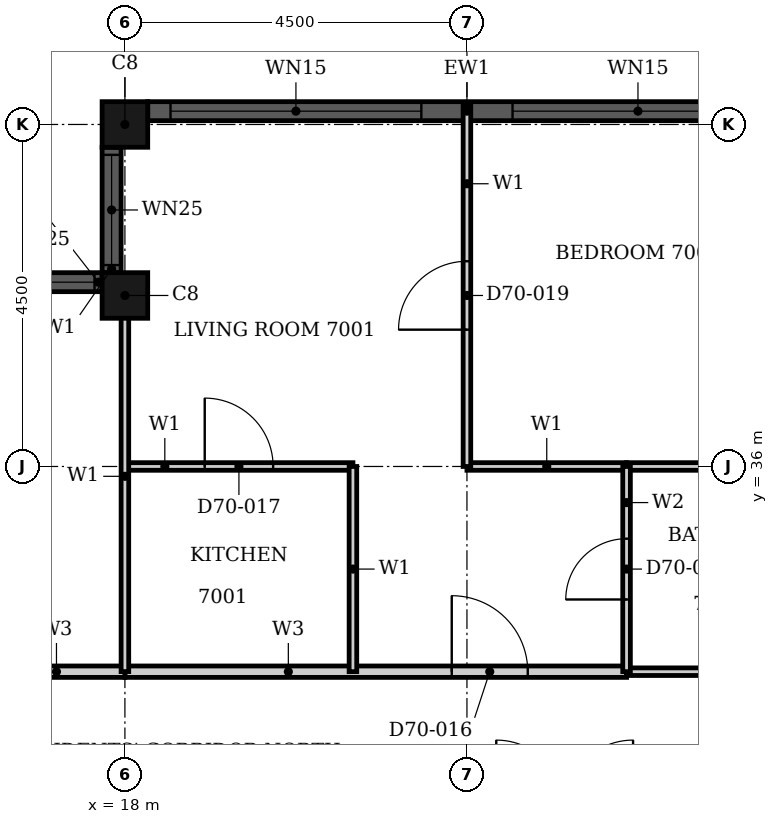
"""IFC4 building model, lengths in metres.
Left out: names, types, materials, properties, quantities, classifications, styles, units other than length and angle.
Written with IfcOpenShell. Run it as: python <this file> out.ifc"""

import sys

from ifc_helpers import new_model, si_unit, direction, frame, frame_2d, origin, origin_2d, place, context, subcontext, project, spatial, rectangle, hollow_rectangle, extrude, element, fill, save


model = new_model("IFC4")
c1 = context("Model", 3, precision=1e-05, world=origin(), true_north=direction((0.0, 1.0)))
c2 = subcontext(c1, "Body", "Model", "MODEL_VIEW")
j1 = project(units=[si_unit("LENGTHUNIT", "METRE"), si_unit("PLANEANGLEUNIT", "RADIAN")], contexts=[c1])
p1 = place(None, origin())
s1 = spatial("IfcSite", under=j1, at=p1, CompositionType="ELEMENT")
p2 = place(p1, origin())
s2 = spatial("IfcBuilding", under=s1, at=p2, CompositionType="ELEMENT")
p3 = place(p2, frame((0.0, 0.0, 274.9)))
s3 = spatial("IfcBuildingStorey", under=s2, at=p3, CompositionType="ELEMENT", Elevation=274.9)
for number, where, z_axis, x_axis in (
    (1, (18.0, 40.5, 0.0), (0.0, 0.0, 1.0), (1.0, 0.0, 0.0)),
    (2, (18.0, 38.25, 0.0), (0.0, 0.0, 1.0), (1.0, 0.0, 0.0)),
):
    element("IfcColumn", number, at=place(p3, frame(where, z_axis=z_axis, x_axis=x_axis)), inside=s3, PredefinedType="COLUMN", context=c2, shape_type="SweptSolid", body=[
        extrude(hollow_rectangle(XDim=0.6, YDim=0.6, WallThickness=0.02, at=origin_2d()), origin(), (0.0, 0.0, 1.0), 3.7),
    ])
p4 = place(p3, frame((26.7, 40.675, 0.0), z_axis=(0.0, 0.0, 1.0), x_axis=(-1.0, 0.0, 0.0)))
e3 = element("IfcWall", 3, at=p4, inside=s3, PredefinedType="SOLIDWALL", context=c2, shape_type="SweptSolid", body=[
    extrude(rectangle(XDim=8.4, YDim=0.25, at=frame_2d((4.2, 0.0))), origin(), (0.0, 0.0, 1.0), 3.7),
])
p5 = place(p4, frame((0.3, 0.0, 0.45)))
e4 = element("IfcOpeningElement", 4, at=p5, cuts=e3, PredefinedType="OPENING", context=c2, shape_type="SweptSolid", body=[
    extrude(rectangle(XDim=3.3, YDim=2.3, at=frame_2d((1.65, 1.15))), frame((0.0, 0.135, 0.0), z_axis=(0.0, -1.0, 0.0), x_axis=(1.0, 0.0, 0.0)), (0.0, 0.0, 1.0), 0.27),
])
p6 = place(p4, frame((4.8, 0.0, 0.45)))
e5 = element("IfcOpeningElement", 5, at=p6, cuts=e3, PredefinedType="OPENING", context=c2, shape_type="SweptSolid", body=[
    extrude(rectangle(XDim=3.3, YDim=2.3, at=frame_2d((1.65, 1.15))), frame((0.0, 0.135, 0.0), z_axis=(0.0, -1.0, 0.0), x_axis=(1.0, 0.0, 0.0)), (0.0, 0.0, 1.0), 0.27),
])
p7 = place(p3, frame((17.825, 40.2, 0.0), z_axis=(0.0, 0.0, 1.0), x_axis=(0.0, -1.0, 0.0)))
e6 = element("IfcWall", 6, at=p7, inside=s3, PredefinedType="SOLIDWALL", context=c2, shape_type="SweptSolid", body=[
    extrude(rectangle(XDim=1.65, YDim=0.25, at=frame_2d((0.825, 0.0))), origin(), (0.0, 0.0, 1.0), 3.7),
])
p8 = place(p7, frame((0.1, 0.0, 0.9)))
e7 = element("IfcOpeningElement", 7, at=p8, cuts=e6, PredefinedType="OPENING", context=c2, shape_type="SweptSolid", body=[
    extrude(rectangle(XDim=1.45, YDim=1.85, at=frame_2d((0.725, 0.925))), frame((0.0, 0.135, 0.0), z_axis=(0.0, -1.0, 0.0), x_axis=(1.0, 0.0, 0.0)), (0.0, 0.0, 1.0), 0.27),
])
p9 = place(p3, frame((17.7, 38.425, 0.0), z_axis=(0.0, 0.0, 1.0), x_axis=(-1.0, 0.0, 0.0)))
e8 = element("IfcWall", 8, at=p9, inside=s3, PredefinedType="SOLIDWALL", context=c2, shape_type="SweptSolid", body=[
    extrude(rectangle(XDim=1.65, YDim=0.25, at=frame_2d((0.825, 0.0))), origin(), (0.0, 0.0, 1.0), 3.7),
])
p10 = place(p9, frame((0.1, 0.0, 0.9)))
e9 = element("IfcOpeningElement", 9, at=p10, cuts=e8, PredefinedType="OPENING", context=c2, shape_type="SweptSolid", body=[
    extrude(rectangle(XDim=1.45, YDim=1.85, at=frame_2d((0.725, 0.925))), frame((0.0, 0.135, 0.0), z_axis=(0.0, -1.0, 0.0), x_axis=(1.0, 0.0, 0.0)), (0.0, 0.0, 1.0), 0.27),
])
p11 = place(p3, frame((18.0, 33.3, 0.0), z_axis=(0.0, 0.0, 1.0), x_axis=(1.0, 0.0, 0.0)))
e10 = element("IfcWall", 10, at=p11, inside=s3, PredefinedType="PARTITIONING", context=c2, shape_type="SweptSolid", body=[
    extrude(rectangle(XDim=6.6, YDim=0.15, at=frame_2d((3.3, 0.0))), origin(), (0.0, 0.0, 1.0), 3.3),
])
p12 = place(p11, frame((4.3, 0.0, 0.0)))
e11 = element("IfcOpeningElement", 11, at=p12, cuts=e10, PredefinedType="OPENING", context=c2, shape_type="SweptSolid", body=[
    extrude(rectangle(XDim=1.0, YDim=2.2, at=frame_2d((0.5, 1.1))), frame((0.0, 0.085, 0.0), z_axis=(0.0, -1.0, 0.0), x_axis=(1.0, 0.0, 0.0)), (0.0, 0.0, 1.0), 0.17),
])
p13 = place(p3, frame((16.2, 33.3, 0.0), z_axis=(0.0, 0.0, 1.0), x_axis=(1.0, 0.0, 0.0)))
e12 = element("IfcWall", 12, at=p13, inside=s3, PredefinedType="PARTITIONING", context=c2, shape_type="SweptSolid", body=[
    extrude(rectangle(XDim=1.799, YDim=0.15, at=frame_2d((0.899, 0.0))), origin(), (0.0, 0.0, 1.0), 3.3),
])
p14 = place(p3, frame((22.5, 36.0, 0.0), z_axis=(0.0, 0.0, 1.0), x_axis=(1.0, 0.0, 0.0)))
e13 = element("IfcWall", 13, at=p14, inside=s3, PredefinedType="PARTITIONING", context=c2, shape_type="SweptSolid", body=[
    extrude(rectangle(XDim=2.1, YDim=0.1, at=frame_2d((1.05, 0.0))), origin(), (0.0, 0.0, 1.0), 3.3),
])
p15 = place(p3, frame((18.0, 36.0, 0.0), z_axis=(0.0, 0.0, 1.0), x_axis=(1.0, 0.0, 0.0)))
e14 = element("IfcWall", 14, at=p15, inside=s3, PredefinedType="PARTITIONING", context=c2, shape_type="SweptSolid", body=[
    extrude(rectangle(XDim=3.0, YDim=0.1, at=frame_2d((1.5, 0.0))), origin(), (0.0, 0.0, 1.0), 3.3),
])
p16 = place(p15, frame((1.05, 0.0, 0.0)))
e15 = element("IfcOpeningElement", 15, at=p16, cuts=e14, PredefinedType="OPENING", context=c2, shape_type="SweptSolid", body=[
    extrude(rectangle(XDim=0.9, YDim=2.1, at=frame_2d((0.45, 1.05))), frame((0.0, 0.06, 0.0), z_axis=(0.0, -1.0, 0.0), x_axis=(1.0, 0.0, 0.0)), (0.0, 0.0, 1.0), 0.12),
])
p17 = place(p3, frame((18.0, 33.301, 0.0), z_axis=(0.0, 0.0, 1.0), x_axis=(0.0, 1.0, 0.0)))
e16 = element("IfcWall", 16, at=p17, inside=s3, PredefinedType="PARTITIONING", context=c2, shape_type="SweptSolid", body=[
    extrude(rectangle(XDim=5.139, YDim=0.1, at=frame_2d((2.569, 0.0))), origin(), (0.0, 0.0, 1.0), 3.3),
])
p18 = place(p3, frame((21.0, 33.3, 0.0), z_axis=(0.0, 0.0, 1.0), x_axis=(0.0, 1.0, 0.0)))
e17 = element("IfcWall", 17, at=p18, inside=s3, PredefinedType="PARTITIONING", context=c2, shape_type="SweptSolid", body=[
    extrude(rectangle(XDim=2.7, YDim=0.1, at=frame_2d((1.35, 0.0))), origin(), (0.0, 0.0, 1.0), 3.3),
])
p19 = place(p3, frame((22.5, 36.0, 0.0), z_axis=(0.0, 0.0, 1.0), x_axis=(0.0, 1.0, 0.0)))
e18 = element("IfcWall", 18, at=p19, inside=s3, PredefinedType="PARTITIONING", context=c2, shape_type="SweptSolid", body=[
    extrude(rectangle(XDim=4.74, YDim=0.1, at=frame_2d((2.37, 0.0))), origin(), (0.0, 0.0, 1.0), 3.3),
])
p20 = place(p19, frame((1.8, 0.0, 0.0)))
e19 = element("IfcOpeningElement", 19, at=p20, cuts=e18, PredefinedType="OPENING", context=c2, shape_type="SweptSolid", body=[
    extrude(rectangle(XDim=0.9, YDim=2.1, at=frame_2d((0.45, 1.05))), frame((0.0, 0.06, 0.0), z_axis=(0.0, -1.0, 0.0), x_axis=(1.0, 0.0, 0.0)), (0.0, 0.0, 1.0), 0.12),
])
for number, where, z_axis, x_axis in (
    (20, (24.6, 33.3, 0.0), (0.0, 0.0, 1.0), (1.0, 0.0, 0.0)),
    (21, (24.6, 36.0, 0.0), (0.0, 0.0, 1.0), (1.0, 0.0, 0.0)),
):
    element("IfcWall", number, at=place(p3, frame(where, z_axis=z_axis, x_axis=x_axis)), inside=s3, PredefinedType="PARTITIONING", context=c2, shape_type="SweptSolid", body=[
        extrude(rectangle(XDim=4.8, YDim=0.1, at=frame_2d((2.4, 0.0))), origin(), (0.0, 0.0, 1.0), 3.3),
    ])
p21 = place(p3, frame((24.6, 33.3, 0.0), z_axis=(0.0, 0.0, 1.0), x_axis=(0.0, 1.0, 0.0)))
e22 = element("IfcWall", 22, at=p21, inside=s3, PredefinedType="PARTITIONING", context=c2, shape_type="SweptSolid", body=[
    extrude(rectangle(XDim=2.7, YDim=0.1, at=frame_2d((1.35, 0.0))), origin(), (0.0, 0.0, 1.0), 3.3),
])
p22 = place(p21, frame((0.95, 0.0, 0.0)))
e23 = element("IfcOpeningElement", 23, at=p22, cuts=e22, PredefinedType="OPENING", context=c2, shape_type="SweptSolid", body=[
    extrude(rectangle(XDim=0.8, YDim=2.1, at=frame_2d((0.4, 1.05))), frame((0.0, 0.06, 0.0), z_axis=(0.0, -1.0, 0.0), x_axis=(1.0, 0.0, 0.0)), (0.0, 0.0, 1.0), 0.12),
])
p23 = place(p5, origin())
e24 = element("IfcWindow", 24, at=p23, inside=s3, PartitioningType="SINGLE_PANEL", PredefinedType="WINDOW", context=c2, shape_type="SweptSolid", body=[
    extrude(rectangle(XDim=3.3, YDim=2.3, at=frame_2d((1.65, 1.15))), frame((0.0, 0.03, 0.0), z_axis=(0.0, -1.0, 0.0), x_axis=(1.0, 0.0, 0.0)), (0.0, 0.0, 1.0), 0.06),
])
fill(e4, e24)
p24 = place(p6, origin())
e25 = element("IfcWindow", 25, at=p24, inside=s3, PartitioningType="SINGLE_PANEL", PredefinedType="WINDOW", context=c2, shape_type="SweptSolid", body=[
    extrude(rectangle(XDim=3.3, YDim=2.3, at=frame_2d((1.65, 1.15))), frame((0.0, 0.03, 0.0), z_axis=(0.0, -1.0, 0.0), x_axis=(1.0, 0.0, 0.0)), (0.0, 0.0, 1.0), 0.06),
])
fill(e5, e25)
p25 = place(p8, origin())
e26 = element("IfcWindow", 26, at=p25, inside=s3, PartitioningType="SINGLE_PANEL", PredefinedType="WINDOW", context=c2, shape_type="SweptSolid", body=[
    extrude(rectangle(XDim=1.45, YDim=1.85, at=frame_2d((0.725, 0.925))), frame((0.0, 0.03, 0.0), z_axis=(0.0, -1.0, 0.0), x_axis=(1.0, 0.0, 0.0)), (0.0, 0.0, 1.0), 0.06),
])
fill(e7, e26)
p26 = place(p10, origin())
e27 = element("IfcWindow", 27, at=p26, inside=s3, PartitioningType="SINGLE_PANEL", PredefinedType="WINDOW", context=c2, shape_type="SweptSolid", body=[
    extrude(rectangle(XDim=1.45, YDim=1.85, at=frame_2d((0.725, 0.925))), frame((0.0, 0.03, 0.0), z_axis=(0.0, -1.0, 0.0), x_axis=(1.0, 0.0, 0.0)), (0.0, 0.0, 1.0), 0.06),
])
fill(e9, e27)
p27 = place(p12, origin())
e28 = element("IfcDoor", 28, at=p27, inside=s3, OperationType="SINGLE_SWING_LEFT", PredefinedType="DOOR", context=c2, shape_type="SweptSolid", body=[
    extrude(rectangle(XDim=1.0, YDim=2.2, at=frame_2d((0.5, 1.1))), frame((0.0, 0.025, 0.0), z_axis=(0.0, -1.0, 0.0), x_axis=(1.0, 0.0, 0.0)), (0.0, 0.0, 1.0), 0.05),
])
fill(e11, e28)
p28 = place(p16, origin())
e29 = element("IfcDoor", 29, at=p28, inside=s3, OperationType="SINGLE_SWING_RIGHT", PredefinedType="DOOR", context=c2, shape_type="SweptSolid", body=[
    extrude(rectangle(XDim=0.9, YDim=2.1, at=frame_2d((0.45, 1.05))), frame((0.0, 0.025, 0.0), z_axis=(0.0, -1.0, 0.0), x_axis=(1.0, 0.0, 0.0)), (0.0, 0.0, 1.0), 0.05),
])
fill(e15, e29)
p29 = place(p22, origin())
e30 = element("IfcDoor", 30, at=p29, inside=s3, OperationType="SINGLE_SWING_LEFT", PredefinedType="DOOR", context=c2, shape_type="SweptSolid", body=[
    extrude(rectangle(XDim=0.8, YDim=2.1, at=frame_2d((0.4, 1.05))), frame((0.0, 0.025, 0.0), z_axis=(0.0, -1.0, 0.0), x_axis=(1.0, 0.0, 0.0)), (0.0, 0.0, 1.0), 0.05),
])
fill(e23, e30)
p30 = place(p20, origin())
e31 = element("IfcDoor", 31, at=p30, inside=s3, OperationType="SINGLE_SWING_RIGHT", PredefinedType="DOOR", context=c2, shape_type="SweptSolid", body=[
    extrude(rectangle(XDim=0.9, YDim=2.1, at=frame_2d((0.45, 1.05))), frame((0.0, 0.025, 0.0), z_axis=(0.0, -1.0, 0.0), x_axis=(1.0, 0.0, 0.0)), (0.0, 0.0, 1.0), 0.05),
])
fill(e19, e31)
save(model, sys.argv[1])
